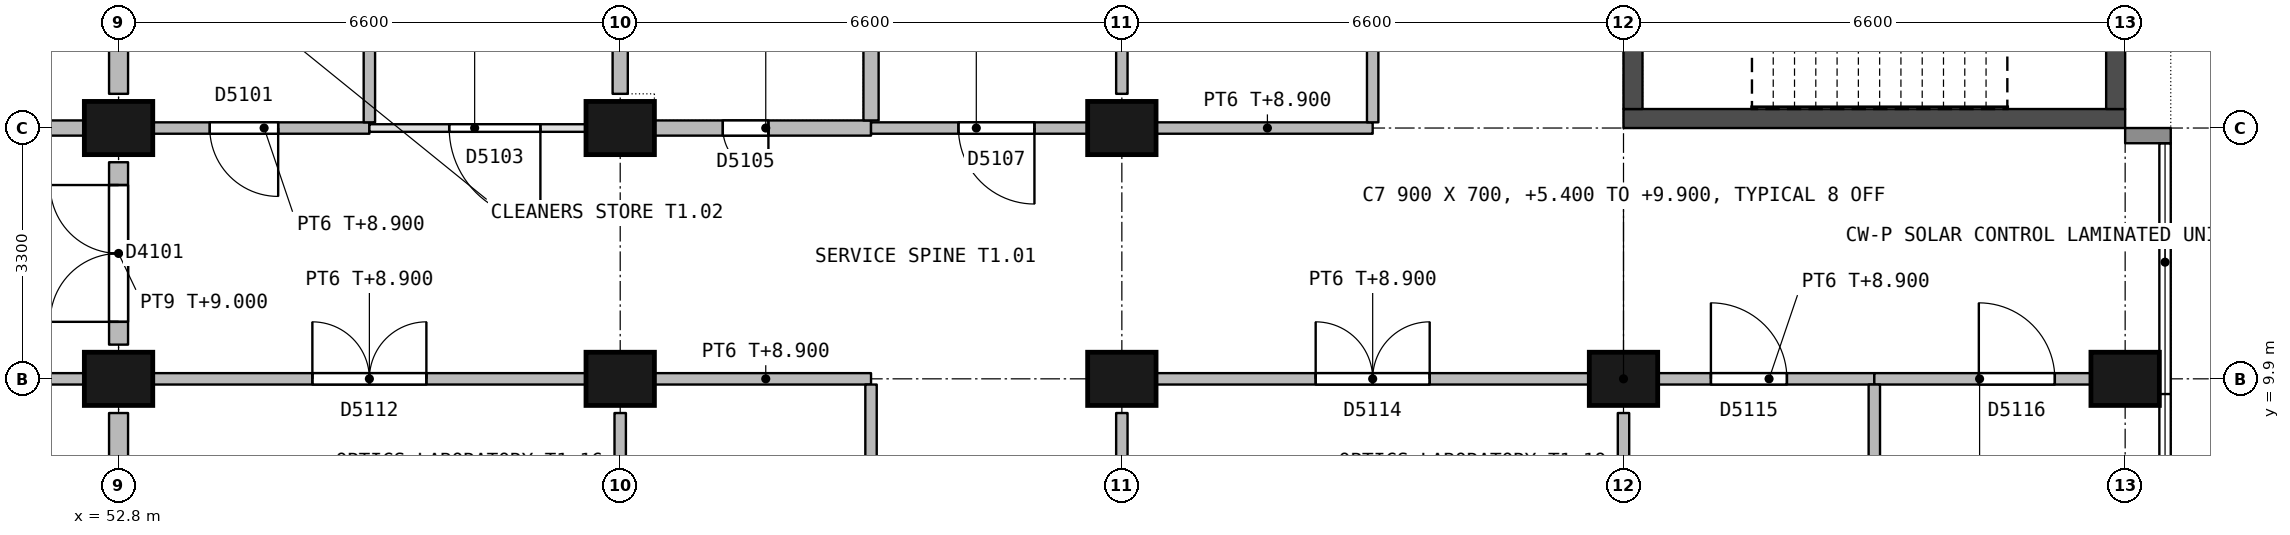
"""IFC4 building model, lengths in metres.
Left out: names, types, materials, properties, quantities, classifications, styles, units other than length and angle.
Written with IfcOpenShell. Run it as: python <this file> out.ifc"""

import sys

from ifc_helpers import new_model, si_unit, direction, frame, frame_2d, origin, origin_2d, place, context, subcontext, project, spatial, rectangle, extrude, element, fill, save


model = new_model("IFC4")
c1 = context("Model", 3, precision=1e-05, world=origin(), true_north=direction((0.0, 1.0)))
c2 = subcontext(c1, "Body", "Model", "MODEL_VIEW")
j1 = project(units=[si_unit("LENGTHUNIT", "METRE"), si_unit("PLANEANGLEUNIT", "RADIAN")], contexts=[c1])
p1 = place(None, origin())
s1 = spatial("IfcSite", under=j1, at=p1, CompositionType="ELEMENT")
p2 = place(p1, origin())
s2 = spatial("IfcBuilding", under=s1, at=p2, CompositionType="ELEMENT")
p3 = place(p2, frame((0.0, 0.0, 5.4)))
s3 = spatial("IfcBuildingStorey", under=s2, at=p3, CompositionType="ELEMENT", Elevation=5.4)
for number, where, z_axis, x_axis in (
    (1, (52.8, 9.9, 0.0), (0.0, 0.0, 1.0), (1.0, 0.0, 0.0)),
    (2, (52.8, 13.2, 0.0), (0.0, 0.0, 1.0), (1.0, 0.0, 0.0)),
    (3, (59.4, 9.9, 0.0), (0.0, 0.0, 1.0), (1.0, 0.0, 0.0)),
    (4, (59.4, 13.2, 0.0), (0.0, 0.0, 1.0), (1.0, 0.0, 0.0)),
    (5, (66.0, 9.9, 0.0), (0.0, 0.0, 1.0), (1.0, 0.0, 0.0)),
    (6, (66.0, 13.2, 0.0), (0.0, 0.0, 1.0), (1.0, 0.0, 0.0)),
    (7, (72.6, 9.9, 0.0), (0.0, 0.0, 1.0), (1.0, 0.0, 0.0)),
    (8, (79.2, 9.9, 0.0), (0.0, 0.0, 1.0), (1.0, 0.0, 0.0)),
):
    element("IfcColumn", number, at=place(p3, frame(where, z_axis=z_axis, x_axis=x_axis)), inside=s3, PredefinedType="COLUMN", context=c2, shape_type="SweptSolid", body=[
        extrude(rectangle(XDim=0.9, YDim=0.7, at=origin_2d()), origin(), (0.0, 0.0, 1.0), 4.5),
    ])
p4 = place(p3, frame((72.6, 13.325, 0.0), z_axis=(0.0, 0.0, 1.0), x_axis=(1.0, 0.0, 0.0)))
e9 = element("IfcWall", 9, at=p4, inside=s3, PredefinedType="SHEAR", context=c2, shape_type="SweptSolid", body=[
    extrude(rectangle(XDim=6.6, YDim=0.25, at=frame_2d((3.3, 0.0))), origin(), (0.0, 0.0, 1.0), 4.2),
])
p5 = place(p3, frame((72.725, 13.45, 0.0), z_axis=(0.0, 0.0, 1.0), x_axis=(0.0, 1.0, 0.0)))
e10 = element("IfcWall", 10, at=p5, inside=s3, PredefinedType="SHEAR", context=c2, shape_type="SweptSolid", body=[
    extrude(rectangle(XDim=9.4, YDim=0.25, at=frame_2d((4.7, 0.0))), origin(), (0.0, 0.0, 1.0), 4.2),
])
p6 = place(p5, frame((4.125, 0.0, 0.0)))
e11 = element("IfcOpeningElement", 11, at=p6, cuts=e10, PredefinedType="OPENING", context=c2, shape_type="SweptSolid", body=[
    extrude(rectangle(XDim=1.2, YDim=2.1, at=frame_2d((0.6, 1.05))), frame((0.0, 0.135, 0.0), z_axis=(0.0, -1.0, 0.0), x_axis=(1.0, 0.0, 0.0)), (0.0, 0.0, 1.0), 0.27),
])
p7 = place(p3, frame((79.075, 13.45, 0.0), z_axis=(0.0, 0.0, 1.0), x_axis=(0.0, 1.0, 0.0)))
e12 = element("IfcWall", 12, at=p7, inside=s3, PredefinedType="SHEAR", context=c2, shape_type="SweptSolid", body=[
    extrude(rectangle(XDim=9.4, YDim=0.25, at=frame_2d((4.7, 0.0))), origin(), (0.0, 0.0, 1.0), 4.2),
])
p8 = place(p7, frame((0.95, 0.0, 0.7)))
e13 = element("IfcOpeningElement", 13, at=p8, cuts=e12, PredefinedType="OPENING", context=c2, shape_type="SweptSolid", body=[
    extrude(rectangle(XDim=1.2, YDim=1.8, at=frame_2d((0.6, 0.9))), frame((0.0, 0.135, 0.0), z_axis=(0.0, -1.0, 0.0), x_axis=(1.0, 0.0, 0.0)), (0.0, 0.0, 1.0), 0.27),
])
p9 = place(p3, frame((79.2, 13.1, 0.0), z_axis=(0.0, 0.0, 1.0), x_axis=(1.0, 0.0, 0.0)))
e14 = element("IfcWall", 14, at=p9, inside=s3, PredefinedType="STANDARD", context=c2, shape_type="SweptSolid", body=[
    extrude(rectangle(XDim=0.6, YDim=0.2, at=frame_2d((0.3, 0.0))), origin(), (0.0, 0.0, 1.0), 3.5),
])
p10 = place(p3, frame((49.5, 13.2, 0.0), z_axis=(0.0, 0.0, 1.0), x_axis=(1.0, 0.0, 0.0)))
e15 = element("IfcWall", 15, at=p10, inside=s3, PredefinedType="PARTITIONING", context=c2, shape_type="SweptSolid", body=[
    extrude(rectangle(XDim=2.85, YDim=0.2, at=frame_2d((1.425, 0.0))), origin(), (0.0, 0.0, 1.0), 3.5),
])
p11 = place(p10, frame((1.35, 0.0, 0.0)))
e16 = element("IfcOpeningElement", 16, at=p11, cuts=e15, PredefinedType="OPENING", context=c2, shape_type="SweptSolid", body=[
    extrude(rectangle(XDim=0.6, YDim=2.1, at=frame_2d((0.3, 1.05))), frame((0.0, 0.11, 0.0), z_axis=(0.0, -1.0, 0.0), x_axis=(1.0, 0.0, 0.0)), (0.0, 0.0, 1.0), 0.22),
])
p12 = place(p3, frame((46.6, 9.9, 0.0), z_axis=(0.0, 0.0, 1.0), x_axis=(1.0, 0.0, 0.0)))
e17 = element("IfcWall", 17, at=p12, inside=s3, PredefinedType="PARTITIONING", context=c2, shape_type="SweptSolid", body=[
    extrude(rectangle(XDim=5.75, YDim=0.15, at=frame_2d((2.875, 0.0))), origin(), (0.0, 0.0, 1.0), 3.5),
])
p13 = place(p12, frame((2.15, 0.0, 0.0)))
e18 = element("IfcOpeningElement", 18, at=p13, cuts=e17, PredefinedType="OPENING", context=c2, shape_type="SweptSolid", body=[
    extrude(rectangle(XDim=1.5, YDim=2.1, at=frame_2d((0.75, 1.05))), frame((0.0, 0.085, 0.0), z_axis=(0.0, -1.0, 0.0), x_axis=(1.0, 0.0, 0.0)), (0.0, 0.0, 1.0), 0.17),
])
p14 = place(p3, frame((52.8, 10.35, 0.0), z_axis=(0.0, 0.0, 1.0), x_axis=(0.0, 1.0, 0.0)))
e19 = element("IfcWall", 19, at=p14, inside=s3, PredefinedType="PARTITIONING", context=c2, shape_type="SweptSolid", body=[
    extrude(rectangle(XDim=2.4, YDim=0.25, at=frame_2d((1.2, 0.0))), origin(), (0.0, 0.0, 1.0), 3.6),
])
p15 = place(p14, frame((0.3, 0.0, 0.0)))
e20 = element("IfcOpeningElement", 20, at=p15, cuts=e19, PredefinedType="OPENING", context=c2, shape_type="SweptSolid", body=[
    extrude(rectangle(XDim=1.8, YDim=2.1, at=frame_2d((0.9, 1.05))), frame((0.0, 0.135, 0.0), z_axis=(0.0, -1.0, 0.0), x_axis=(1.0, 0.0, 0.0)), (0.0, 0.0, 1.0), 0.27),
])
p16 = place(p3, frame((52.8, 13.65, 0.0), z_axis=(0.0, 0.0, 1.0), x_axis=(0.0, 1.0, 0.0)))
e21 = element("IfcWall", 21, at=p16, inside=s3, PredefinedType="PARTITIONING", context=c2, shape_type="SweptSolid", body=[
    extrude(rectangle(XDim=2.75, YDim=0.25, at=frame_2d((1.375, 0.0))), origin(), (0.0, 0.0, 1.0), 3.3),
])
p17 = place(p3, frame((52.8, 3.9, 0.0), z_axis=(0.0, 0.0, 1.0), x_axis=(0.0, 1.0, 0.0)))
e22 = element("IfcWall", 22, at=p17, inside=s3, PredefinedType="PARTITIONING", context=c2, shape_type="SweptSolid", body=[
    extrude(rectangle(XDim=5.55, YDim=0.25, at=frame_2d((2.775, 0.0))), origin(), (0.0, 0.0, 1.0), 3.3),
])
p18 = place(p3, frame((56.1, 13.2, 0.0), z_axis=(0.0, 0.0, 1.0), x_axis=(-1.0, 0.0, 0.0)))
e23 = element("IfcWall", 23, at=p18, inside=s3, PredefinedType="PARTITIONING", context=c2, shape_type="SweptSolid", body=[
    extrude(rectangle(XDim=2.85, YDim=0.15, at=frame_2d((1.425, 0.0))), origin(), (0.0, 0.0, 1.0), 3.5),
])
p19 = place(p18, frame((1.2, 0.0, 0.0)))
e24 = element("IfcOpeningElement", 24, at=p19, cuts=e23, PredefinedType="OPENING", context=c2, shape_type="SweptSolid", body=[
    extrude(rectangle(XDim=0.9, YDim=2.1, at=frame_2d((0.45, 1.05))), frame((0.0, 0.085, 0.0), z_axis=(0.0, -1.0, 0.0), x_axis=(1.0, 0.0, 0.0)), (0.0, 0.0, 1.0), 0.17),
])
p20 = place(p3, frame((56.1, 13.2, 0.0), z_axis=(0.0, 0.0, 1.0), x_axis=(1.0, 0.0, 0.0)))
e25 = element("IfcWall", 25, at=p20, inside=s3, PredefinedType="PARTITIONING", context=c2, shape_type="SweptSolid", body=[
    extrude(rectangle(XDim=2.85, YDim=0.1, at=frame_2d((1.425, 0.0))), origin(), (0.0, 0.0, 1.0), 3.5),
])
p21 = place(p20, frame((1.05, 0.0, 0.0)))
e26 = element("IfcOpeningElement", 26, at=p21, cuts=e25, PredefinedType="OPENING", context=c2, shape_type="SweptSolid", body=[
    extrude(rectangle(XDim=1.2, YDim=2.1, at=frame_2d((0.6, 1.05))), frame((0.0, 0.06, 0.0), z_axis=(0.0, -1.0, 0.0), x_axis=(1.0, 0.0, 0.0)), (0.0, 0.0, 1.0), 0.12),
])
p22 = place(p3, frame((59.85, 13.2, 0.0), z_axis=(0.0, 0.0, 1.0), x_axis=(1.0, 0.0, 0.0)))
e27 = element("IfcWall", 27, at=p22, inside=s3, PredefinedType="PARTITIONING", context=c2, shape_type="SweptSolid", body=[
    extrude(rectangle(XDim=2.85, YDim=0.2, at=frame_2d((1.425, 0.0))), origin(), (0.0, 0.0, 1.0), 3.5),
])
p23 = place(p22, frame((0.9, 0.0, 0.0)))
e28 = element("IfcOpeningElement", 28, at=p23, cuts=e27, PredefinedType="OPENING", context=c2, shape_type="SweptSolid", body=[
    extrude(rectangle(XDim=0.6, YDim=2.1, at=frame_2d((0.3, 1.05))), frame((0.0, 0.11, 0.0), z_axis=(0.0, -1.0, 0.0), x_axis=(1.0, 0.0, 0.0)), (0.0, 0.0, 1.0), 0.22),
])
p24 = place(p3, frame((62.7, 13.2, 0.0), z_axis=(0.0, 0.0, 1.0), x_axis=(1.0, 0.0, 0.0)))
e29 = element("IfcWall", 29, at=p24, inside=s3, PredefinedType="PARTITIONING", context=c2, shape_type="SweptSolid", body=[
    extrude(rectangle(XDim=2.85, YDim=0.15, at=frame_2d((1.425, 0.0))), origin(), (0.0, 0.0, 1.0), 3.5),
])
p25 = place(p24, frame((1.15, 0.0, 0.0)))
e30 = element("IfcOpeningElement", 30, at=p25, cuts=e29, PredefinedType="OPENING", context=c2, shape_type="SweptSolid", body=[
    extrude(rectangle(XDim=1.0, YDim=2.1, at=frame_2d((0.5, 1.05))), frame((0.0, 0.085, 0.0), z_axis=(0.0, -1.0, 0.0), x_axis=(1.0, 0.0, 0.0)), (0.0, 0.0, 1.0), 0.17),
])
p26 = place(p3, frame((69.3, 13.2, 0.0), z_axis=(0.0, 0.0, 1.0), x_axis=(-1.0, 0.0, 0.0)))
e31 = element("IfcWall", 31, at=p26, inside=s3, PredefinedType="PARTITIONING", context=c2, shape_type="SweptSolid", body=[
    extrude(rectangle(XDim=2.85, YDim=0.15, at=frame_2d((1.425, 0.0))), origin(), (0.0, 0.0, 1.0), 3.5),
])
p27 = place(p3, frame((53.25, 9.9, 0.0), z_axis=(0.0, 0.0, 1.0), x_axis=(1.0, 0.0, 0.0)))
e32 = element("IfcWall", 32, at=p27, inside=s3, PredefinedType="PARTITIONING", context=c2, shape_type="SweptSolid", body=[
    extrude(rectangle(XDim=5.7, YDim=0.15, at=frame_2d((2.85, 0.0))), origin(), (0.0, 0.0, 1.0), 3.5),
])
p28 = place(p27, frame((2.1, 0.0, 0.0)))
e33 = element("IfcOpeningElement", 33, at=p28, cuts=e32, PredefinedType="OPENING", context=c2, shape_type="SweptSolid", body=[
    extrude(rectangle(XDim=1.5, YDim=2.1, at=frame_2d((0.75, 1.05))), frame((0.0, 0.085, 0.0), z_axis=(0.0, -1.0, 0.0), x_axis=(1.0, 0.0, 0.0)), (0.0, 0.0, 1.0), 0.17),
])
p29 = place(p3, frame((59.85, 9.9, 0.0), z_axis=(0.0, 0.0, 1.0), x_axis=(1.0, 0.0, 0.0)))
e34 = element("IfcWall", 34, at=p29, inside=s3, PredefinedType="PARTITIONING", context=c2, shape_type="SweptSolid", body=[
    extrude(rectangle(XDim=2.85, YDim=0.15, at=frame_2d((1.425, 0.0))), origin(), (0.0, 0.0, 1.0), 3.5),
])
p30 = place(p3, frame((66.45, 9.9, 0.0), z_axis=(0.0, 0.0, 1.0), x_axis=(1.0, 0.0, 0.0)))
e35 = element("IfcWall", 35, at=p30, inside=s3, PredefinedType="PARTITIONING", context=c2, shape_type="SweptSolid", body=[
    extrude(rectangle(XDim=5.7, YDim=0.15, at=frame_2d((2.85, 0.0))), origin(), (0.0, 0.0, 1.0), 3.5),
])
p31 = place(p30, frame((2.1, 0.0, 0.0)))
e36 = element("IfcOpeningElement", 36, at=p31, cuts=e35, PredefinedType="OPENING", context=c2, shape_type="SweptSolid", body=[
    extrude(rectangle(XDim=1.5, YDim=2.1, at=frame_2d((0.75, 1.05))), frame((0.0, 0.085, 0.0), z_axis=(0.0, -1.0, 0.0), x_axis=(1.0, 0.0, 0.0)), (0.0, 0.0, 1.0), 0.17),
])
p32 = place(p3, frame((73.05, 9.9, 0.0), z_axis=(0.0, 0.0, 1.0), x_axis=(1.0, 0.0, 0.0)))
e37 = element("IfcWall", 37, at=p32, inside=s3, PredefinedType="PARTITIONING", context=c2, shape_type="SweptSolid", body=[
    extrude(rectangle(XDim=2.85, YDim=0.15, at=frame_2d((1.425, 0.0))), origin(), (0.0, 0.0, 1.0), 3.5),
])
p33 = place(p32, frame((0.7, 0.0, 0.0)))
e38 = element("IfcOpeningElement", 38, at=p33, cuts=e37, PredefinedType="OPENING", context=c2, shape_type="SweptSolid", body=[
    extrude(rectangle(XDim=1.0, YDim=2.1, at=frame_2d((0.5, 1.05))), frame((0.0, 0.085, 0.0), z_axis=(0.0, -1.0, 0.0), x_axis=(1.0, 0.0, 0.0)), (0.0, 0.0, 1.0), 0.17),
])
p34 = place(p3, frame((75.9, 9.9, 0.0), z_axis=(0.0, 0.0, 1.0), x_axis=(1.0, 0.0, 0.0)))
e39 = element("IfcWall", 39, at=p34, inside=s3, PredefinedType="PARTITIONING", context=c2, shape_type="SweptSolid", body=[
    extrude(rectangle(XDim=2.85, YDim=0.15, at=frame_2d((1.425, 0.0))), origin(), (0.0, 0.0, 1.0), 3.5),
])
p35 = place(p34, frame((1.375, 0.0, 0.0)))
e40 = element("IfcOpeningElement", 40, at=p35, cuts=e39, PredefinedType="OPENING", context=c2, shape_type="SweptSolid", body=[
    extrude(rectangle(XDim=1.0, YDim=2.1, at=frame_2d((0.5, 1.05))), frame((0.0, 0.085, 0.0), z_axis=(0.0, -1.0, 0.0), x_axis=(1.0, 0.0, 0.0)), (0.0, 0.0, 1.0), 0.17),
])
p36 = place(p3, frame((56.1, 13.275, 0.0), z_axis=(0.0, 0.0, 1.0), x_axis=(0.0, 1.0, 0.0)))
e41 = element("IfcWall", 41, at=p36, inside=s3, PredefinedType="PARTITIONING", context=c2, shape_type="SweptSolid", body=[
    extrude(rectangle(XDim=3.15, YDim=0.15, at=frame_2d((1.575, 0.0))), origin(), (0.0, 0.0, 1.0), 4.2),
])
p37 = place(p3, frame((59.4, 13.65, 0.0), z_axis=(0.0, 0.0, 1.0), x_axis=(0.0, 1.0, 0.0)))
e42 = element("IfcWall", 42, at=p37, inside=s3, PredefinedType="PARTITIONING", context=c2, shape_type="SweptSolid", body=[
    extrude(rectangle(XDim=2.85, YDim=0.2, at=frame_2d((1.425, 0.0))), origin(), (0.0, 0.0, 1.0), 3.3),
])
p38 = place(p3, frame((62.7, 13.3, 0.0), z_axis=(0.0, 0.0, 1.0), x_axis=(0.0, 1.0, 0.0)))
e43 = element("IfcWall", 43, at=p38, inside=s3, PredefinedType="PARTITIONING", context=c2, shape_type="SweptSolid", body=[
    extrude(rectangle(XDim=3.1, YDim=0.2, at=frame_2d((1.55, 0.0))), origin(), (0.0, 0.0, 1.0), 4.2),
])
p39 = place(p3, frame((66.0, 13.65, 0.0), z_axis=(0.0, 0.0, 1.0), x_axis=(0.0, 1.0, 0.0)))
e44 = element("IfcWall", 44, at=p39, inside=s3, PredefinedType="PARTITIONING", context=c2, shape_type="SweptSolid", body=[
    extrude(rectangle(XDim=9.0, YDim=0.15, at=frame_2d((4.5, 0.0))), origin(), (0.0, 0.0, 1.0), 3.3),
])
p40 = place(p3, frame((69.3, 23.1, 0.0), z_axis=(0.0, 0.0, 1.0), x_axis=(0.0, -1.0, 0.0)))
e45 = element("IfcWall", 45, at=p40, inside=s3, PredefinedType="PARTITIONING", context=c2, shape_type="SweptSolid", body=[
    extrude(rectangle(XDim=9.825, YDim=0.15, at=frame_2d((4.913, 0.0))), origin(), (0.0, 0.0, 1.0), 4.2),
])
p41 = place(p40, frame((4.05, 0.0, 0.0)))
e46 = element("IfcOpeningElement", 46, at=p41, cuts=e45, PredefinedType="OPENING", context=c2, shape_type="SweptSolid", body=[
    extrude(rectangle(XDim=1.8, YDim=2.4, at=frame_2d((0.9, 1.2))), frame((0.0, 0.085, 0.0), z_axis=(0.0, -1.0, 0.0), x_axis=(1.0, 0.0, 0.0)), (0.0, 0.0, 1.0), 0.17),
])
p42 = place(p3, frame((59.4, 3.975, 0.0), z_axis=(0.0, 0.0, 1.0), x_axis=(0.0, 1.0, 0.0)))
e47 = element("IfcWall", 47, at=p42, inside=s3, PredefinedType="PARTITIONING", context=c2, shape_type="SweptSolid", body=[
    extrude(rectangle(XDim=5.475, YDim=0.15, at=frame_2d((2.737, 0.0))), origin(), (0.0, 0.0, 1.0), 3.3),
])
p43 = place(p3, frame((62.7, 9.825, 0.0), z_axis=(0.0, 0.0, 1.0), x_axis=(0.0, -1.0, 0.0)))
e48 = element("IfcWall", 48, at=p43, inside=s3, PredefinedType="PARTITIONING", context=c2, shape_type="SweptSolid", body=[
    extrude(rectangle(XDim=5.85, YDim=0.15, at=frame_2d((2.925, 0.0))), origin(), (0.0, 0.0, 1.0), 4.2),
])
p44 = place(p43, frame((2.425, 0.0, 0.0)))
e49 = element("IfcOpeningElement", 49, at=p44, cuts=e48, PredefinedType="OPENING", context=c2, shape_type="SweptSolid", body=[
    extrude(rectangle(XDim=1.0, YDim=2.1, at=frame_2d((0.5, 1.05))), frame((0.0, 0.085, 0.0), z_axis=(0.0, -1.0, 0.0), x_axis=(1.0, 0.0, 0.0)), (0.0, 0.0, 1.0), 0.17),
])
for number, where, z_axis, x_axis in (
    (50, (66.0, 3.975, 0.0), (0.0, 0.0, 1.0), (0.0, 1.0, 0.0)),
    (51, (72.6, 3.975, 0.0), (0.0, 0.0, 1.0), (0.0, 1.0, 0.0)),
):
    element("IfcWall", number, at=place(p3, frame(where, z_axis=z_axis, x_axis=x_axis)), inside=s3, PredefinedType="PARTITIONING", context=c2, shape_type="SweptSolid", body=[
        extrude(rectangle(XDim=5.475, YDim=0.15, at=frame_2d((2.737, 0.0))), origin(), (0.0, 0.0, 1.0), 3.3),
    ])
p45 = place(p3, frame((75.9, 3.975, 0.0), z_axis=(0.0, 0.0, 1.0), x_axis=(0.0, 1.0, 0.0)))
e52 = element("IfcWall", 52, at=p45, inside=s3, PredefinedType="PARTITIONING", context=c2, shape_type="SweptSolid", body=[
    extrude(rectangle(XDim=5.85, YDim=0.15, at=frame_2d((2.925, 0.0))), origin(), (0.0, 0.0, 1.0), 4.2),
])
p46 = place(p15, origin())
e53 = element("IfcDoor", 53, at=p46, inside=s3, OperationType="DOUBLE_DOOR_SINGLE_SWING", PredefinedType="DOOR", context=c2, shape_type="SweptSolid", body=[
    extrude(rectangle(XDim=1.8, YDim=2.1, at=frame_2d((0.9, 1.05))), frame((0.0, 0.03, 0.0), z_axis=(0.0, -1.0, 0.0), x_axis=(1.0, 0.0, 0.0)), (0.0, 0.0, 1.0), 0.06),
])
fill(e20, e53)
p47 = place(p19, origin())
e54 = element("IfcDoor", 54, at=p47, inside=s3, OperationType="SINGLE_SWING_LEFT", PredefinedType="DOOR", context=c2, shape_type="SweptSolid", body=[
    extrude(rectangle(XDim=0.9, YDim=2.1, at=frame_2d((0.45, 1.05))), frame((0.0, 0.027, 0.0), z_axis=(0.0, -1.0, 0.0), x_axis=(1.0, 0.0, 0.0)), (0.0, 0.0, 1.0), 0.054),
])
fill(e24, e54)
p48 = place(p21, origin())
e55 = element("IfcDoor", 55, at=p48, inside=s3, OperationType="SINGLE_SWING_RIGHT", PredefinedType="DOOR", context=c2, shape_type="SweptSolid", body=[
    extrude(rectangle(XDim=1.2, YDim=2.1, at=frame_2d((0.6, 1.05))), frame((0.0, 0.022, 0.0), z_axis=(0.0, -1.0, 0.0), x_axis=(1.0, 0.0, 0.0)), (0.0, 0.0, 1.0), 0.044),
])
fill(e26, e55)
p49 = place(p23, origin())
e56 = element("IfcDoor", 56, at=p49, inside=s3, OperationType="SINGLE_SWING_RIGHT", PredefinedType="DOOR", context=c2, shape_type="SweptSolid", body=[
    extrude(rectangle(XDim=0.6, YDim=2.1, at=frame_2d((0.3, 1.05))), frame((0.0, 0.03, 0.0), z_axis=(0.0, -1.0, 0.0), x_axis=(1.0, 0.0, 0.0)), (0.0, 0.0, 1.0), 0.06),
])
fill(e28, e56)
p50 = place(p25, origin())
e57 = element("IfcDoor", 57, at=p50, inside=s3, OperationType="SINGLE_SWING_RIGHT", PredefinedType="DOOR", context=c2, shape_type="SweptSolid", body=[
    extrude(rectangle(XDim=1.0, YDim=2.1, at=frame_2d((0.5, 1.05))), frame((0.0, 0.027, 0.0), z_axis=(0.0, -1.0, 0.0), x_axis=(1.0, 0.0, 0.0)), (0.0, 0.0, 1.0), 0.054),
])
fill(e30, e57)
p51 = place(p28, origin())
e58 = element("IfcDoor", 58, at=p51, inside=s3, OperationType="DOUBLE_DOOR_SINGLE_SWING", PredefinedType="DOOR", context=c2, shape_type="SweptSolid", body=[
    extrude(rectangle(XDim=1.5, YDim=2.1, at=frame_2d((0.75, 1.05))), frame((0.0, 0.027, 0.0), z_axis=(0.0, -1.0, 0.0), x_axis=(1.0, 0.0, 0.0)), (0.0, 0.0, 1.0), 0.054),
])
fill(e33, e58)
p52 = place(p31, origin())
e59 = element("IfcDoor", 59, at=p52, inside=s3, OperationType="DOUBLE_DOOR_SINGLE_SWING", PredefinedType="DOOR", context=c2, shape_type="SweptSolid", body=[
    extrude(rectangle(XDim=1.5, YDim=2.1, at=frame_2d((0.75, 1.05))), frame((0.0, 0.027, 0.0), z_axis=(0.0, -1.0, 0.0), x_axis=(1.0, 0.0, 0.0)), (0.0, 0.0, 1.0), 0.054),
])
fill(e36, e59)
p53 = place(p33, origin())
e60 = element("IfcDoor", 60, at=p53, inside=s3, OperationType="SINGLE_SWING_LEFT", PredefinedType="DOOR", context=c2, shape_type="SweptSolid", body=[
    extrude(rectangle(XDim=1.0, YDim=2.1, at=frame_2d((0.5, 1.05))), frame((0.0, 0.027, 0.0), z_axis=(0.0, -1.0, 0.0), x_axis=(1.0, 0.0, 0.0)), (0.0, 0.0, 1.0), 0.054),
])
fill(e38, e60)
p54 = place(p35, origin())
e61 = element("IfcDoor", 61, at=p54, inside=s3, OperationType="SINGLE_SWING_LEFT", PredefinedType="DOOR", context=c2, shape_type="SweptSolid", body=[
    extrude(rectangle(XDim=1.0, YDim=2.1, at=frame_2d((0.5, 1.05))), frame((0.0, 0.027, 0.0), z_axis=(0.0, -1.0, 0.0), x_axis=(1.0, 0.0, 0.0)), (0.0, 0.0, 1.0), 0.054),
])
fill(e40, e61)
save(model, sys.argv[1])
